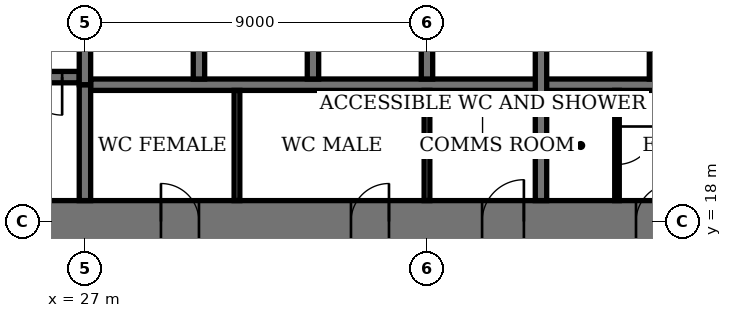
"""IFC4 building model, lengths in metres.
Left out: names, types, materials, properties, quantities, classifications, styles, units other than length and angle.
Written with IfcOpenShell. Run it as: python <this file> out.ifc"""

import sys

from ifc_helpers import new_model, si_unit, direction, frame, frame_2d, origin, place, context, subcontext, project, spatial, rectangle, extrude, element, fill, save


model = new_model("IFC4")
c1 = context("Model", 3, precision=1e-05, world=origin(), true_north=direction((0.0, 1.0)))
c2 = subcontext(c1, "Body", "Model", "MODEL_VIEW")
j1 = project(units=[si_unit("LENGTHUNIT", "METRE"), si_unit("PLANEANGLEUNIT", "RADIAN")], contexts=[c1])
p1 = place(None, origin())
s1 = spatial("IfcSite", under=j1, at=p1, CompositionType="ELEMENT")
p2 = place(p1, origin())
s2 = spatial("IfcBuilding", under=s1, at=p2, CompositionType="ELEMENT")
p3 = place(p2, frame((0.0, 0.0, 97.0)))
s3 = spatial("IfcBuildingStorey", under=s2, at=p3, CompositionType="ELEMENT", Elevation=97.0)
p4 = place(p3, frame((17.45, 18.0, 0.0), z_axis=(0.0, 0.0, 1.0), x_axis=(1.0, 0.0, 0.0)))
e1 = element("IfcWall", 1, at=p4, inside=s3, PredefinedType="SHEAR", context=c2, shape_type="SweptSolid", body=[
    extrude(rectangle(XDim=28.1, YDim=1.1, at=frame_2d((14.05, 0.0))), origin(), (0.0, 0.0, 1.0), 4.0),
])
p5 = place(p4, frame((11.55, 0.0, 0.0)))
e2 = element("IfcOpeningElement", 2, at=p5, cuts=e1, PredefinedType="OPENING", context=c2, shape_type="SweptSolid", body=[
    extrude(rectangle(XDim=1.0, YDim=2.4, at=frame_2d((0.5, 1.2))), frame((0.0, 0.56, 0.0), z_axis=(0.0, -1.0, 0.0), x_axis=(1.0, 0.0, 0.0)), (0.0, 0.0, 1.0), 1.12),
])
p6 = place(p4, frame((16.55, 0.0, 0.0)))
e3 = element("IfcOpeningElement", 3, at=p6, cuts=e1, PredefinedType="OPENING", context=c2, shape_type="SweptSolid", body=[
    extrude(rectangle(XDim=1.0, YDim=2.4, at=frame_2d((0.5, 1.2))), frame((0.0, 0.56, 0.0), z_axis=(0.0, -1.0, 0.0), x_axis=(1.0, 0.0, 0.0)), (0.0, 0.0, 1.0), 1.12),
])
p7 = place(p4, frame((20.0, 0.0, 0.0)))
e4 = element("IfcOpeningElement", 4, at=p7, cuts=e1, PredefinedType="OPENING", context=c2, shape_type="SweptSolid", body=[
    extrude(rectangle(XDim=1.1, YDim=2.4, at=frame_2d((0.55, 1.2))), frame((0.0, 0.56, 0.0), z_axis=(0.0, -1.0, 0.0), x_axis=(1.0, 0.0, 0.0)), (0.0, 0.0, 1.0), 1.12),
])
p8 = place(p4, frame((24.05, 0.0, 0.0)))
e5 = element("IfcOpeningElement", 5, at=p8, cuts=e1, PredefinedType="OPENING", context=c2, shape_type="SweptSolid", body=[
    extrude(rectangle(XDim=1.0, YDim=2.4, at=frame_2d((0.5, 1.2))), frame((0.0, 0.56, 0.0), z_axis=(0.0, -1.0, 0.0), x_axis=(1.0, 0.0, 0.0)), (0.0, 0.0, 1.0), 1.12),
])
p9 = place(p3, frame((18.55, 21.8, 0.0), z_axis=(0.0, 0.0, 1.0), x_axis=(1.0, 0.0, 0.0)))
e6 = element("IfcWall", 6, at=p9, inside=s3, PredefinedType="SHEAR", context=c2, shape_type="SweptSolid", body=[
    extrude(rectangle(XDim=8.3, YDim=0.3, at=frame_2d((4.15, 0.0))), origin(), (0.0, 0.0, 1.0), 4.0),
])
p10 = place(p9, frame((6.85, 0.0, 0.0)))
e7 = element("IfcOpeningElement", 7, at=p10, cuts=e6, PredefinedType="OPENING", context=c2, shape_type="SweptSolid", body=[
    extrude(rectangle(XDim=1.0, YDim=2.4, at=frame_2d((0.5, 1.2))), frame((0.0, 0.16, 0.0), z_axis=(0.0, -1.0, 0.0), x_axis=(1.0, 0.0, 0.0)), (0.0, 0.0, 1.0), 0.32),
])
p11 = place(p3, frame((27.0, 18.55, 0.0), z_axis=(0.0, 0.0, 1.0), x_axis=(0.0, 1.0, 0.0)))
e8 = element("IfcWall", 8, at=p11, inside=s3, PredefinedType="SHEAR", context=c2, shape_type="SweptSolid", body=[
    extrude(rectangle(XDim=3.05, YDim=0.3, at=frame_2d((1.525, 0.0))), origin(), (0.0, 0.0, 1.0), 4.0),
])
p12 = place(p3, frame((27.15, 21.6, 0.0), z_axis=(0.0, 0.0, 1.0), x_axis=(1.0, 0.0, 0.0)))
e9 = element("IfcWall", 9, at=p12, inside=s3, PredefinedType="SHEAR", context=c2, shape_type="SweptSolid", body=[
    extrude(rectangle(XDim=17.3, YDim=0.3, at=frame_2d((8.65, 0.0))), origin(), (0.0, 0.0, 1.0), 4.0),
])
for number, where, z_axis, x_axis in (
    (10, (30.0, 21.75, 0.0), (0.0, 0.0, 1.0), (0.0, 1.0, 0.0)),
    (11, (33.0, 21.75, 0.0), (0.0, 0.0, 1.0), (0.0, 1.0, 0.0)),
    (12, (36.0, 21.75, 0.0), (0.0, 0.0, 1.0), (0.0, 1.0, 0.0)),
):
    element("IfcWall", number, at=place(p3, frame(where, z_axis=z_axis, x_axis=x_axis)), inside=s3, PredefinedType="SHEAR", context=c2, shape_type="SweptSolid", body=[
        extrude(rectangle(XDim=2.7, YDim=0.3, at=frame_2d((1.35, 0.0))), origin(), (0.0, 0.0, 1.0), 4.0),
    ])
p13 = place(p3, frame((39.0, 18.55, 0.0), z_axis=(0.0, 0.0, 1.0), x_axis=(0.0, 1.0, 0.0)))
e13 = element("IfcWall", 13, at=p13, inside=s3, PredefinedType="SHEAR", context=c2, shape_type="SweptSolid", body=[
    extrude(rectangle(XDim=5.9, YDim=0.3, at=frame_2d((2.95, 0.0))), origin(), (0.0, 0.0, 1.0), 4.0),
])
p14 = place(p3, frame((42.0, 21.75, 0.0), z_axis=(0.0, 0.0, 1.0), x_axis=(0.0, 1.0, 0.0)))
e14 = element("IfcWall", 14, at=p14, inside=s3, PredefinedType="SHEAR", context=c2, shape_type="SweptSolid", body=[
    extrude(rectangle(XDim=2.7, YDim=0.3, at=frame_2d((1.35, 0.0))), origin(), (0.0, 0.0, 1.0), 4.0),
])
p15 = place(p3, frame((27.0, 21.6, 0.0), z_axis=(0.0, 0.0, 1.0), x_axis=(0.0, 1.0, 0.0)))
e15 = element("IfcWall", 15, at=p15, inside=s3, PredefinedType="SHEAR", context=c2, shape_type="SweptSolid", body=[
    extrude(rectangle(XDim=2.85, YDim=0.3, at=frame_2d((1.425, 0.0))), origin(), (0.0, 0.0, 1.0), 4.0),
])
for number, where, z_axis, x_axis in (
    (16, (31.0, 18.55, 0.0), (0.0, 0.0, 1.0), (0.0, 1.0, 0.0)),
    (17, (36.0, 18.55, 0.0), (0.0, 0.0, 1.0), (0.0, 1.0, 0.0)),
):
    element("IfcWall", number, at=place(p3, frame(where, z_axis=z_axis, x_axis=x_axis)), inside=s3, PredefinedType="PARTITIONING", context=c2, shape_type="SweptSolid", body=[
        extrude(rectangle(XDim=2.9, YDim=0.15, at=frame_2d((1.45, 0.0))), origin(), (0.0, 0.0, 1.0), 3.75),
    ])
p16 = place(p3, frame((41.0, 18.55, 0.0), z_axis=(0.0, 0.0, 1.0), x_axis=(0.0, 1.0, 0.0)))
e18 = element("IfcWall", 18, at=p16, inside=s3, PredefinedType="PARTITIONING", context=c2, shape_type="SweptSolid", body=[
    extrude(rectangle(XDim=2.9, YDim=0.12, at=frame_2d((1.45, 0.0))), origin(), (0.0, 0.0, 1.0), 3.75),
])
p17 = place(p16, frame((0.95, 0.0, 0.0)))
e19 = element("IfcOpeningElement", 19, at=p17, cuts=e18, PredefinedType="OPENING", context=c2, shape_type="SweptSolid", body=[
    extrude(rectangle(XDim=1.0, YDim=2.4, at=frame_2d((0.5, 1.2))), frame((0.0, 0.07, 0.0), z_axis=(0.0, -1.0, 0.0), x_axis=(1.0, 0.0, 0.0)), (0.0, 0.0, 1.0), 0.14),
])
p18 = place(p5, origin())
e20 = element("IfcDoor", 20, at=p18, inside=s3, OperationType="SINGLE_SWING_RIGHT", PredefinedType="DOOR", context=c2, shape_type="SweptSolid", body=[
    extrude(rectangle(XDim=1.0, YDim=2.4, at=frame_2d((0.5, 1.2))), frame((0.0, 0.025, 0.0), z_axis=(0.0, -1.0, 0.0), x_axis=(1.0, 0.0, 0.0)), (0.0, 0.0, 1.0), 0.05),
    extrude(rectangle(XDim=0.04, YDim=2.4, at=frame_2d((0.02, 1.2))), frame((0.0, 0.4, 0.0), z_axis=(0.0, -1.0, 0.0), x_axis=(1.0, 0.0, 0.0)), (0.0, 0.0, 1.0), 0.8),
    extrude(rectangle(XDim=0.04, YDim=2.4, at=frame_2d((0.98, 1.2))), frame((0.0, 0.4, 0.0), z_axis=(0.0, -1.0, 0.0), x_axis=(1.0, 0.0, 0.0)), (0.0, 0.0, 1.0), 0.8),
    extrude(rectangle(XDim=1.0, YDim=0.04, at=frame_2d((0.5, 2.38))), frame((0.0, 0.4, 0.0), z_axis=(0.0, -1.0, 0.0), x_axis=(1.0, 0.0, 0.0)), (0.0, 0.0, 1.0), 0.8),
])
fill(e2, e20)
p19 = place(p6, origin())
e21 = element("IfcDoor", 21, at=p19, inside=s3, OperationType="SINGLE_SWING_LEFT", PredefinedType="DOOR", context=c2, shape_type="SweptSolid", body=[
    extrude(rectangle(XDim=1.0, YDim=2.4, at=frame_2d((0.5, 1.2))), frame((0.0, 0.025, 0.0), z_axis=(0.0, -1.0, 0.0), x_axis=(1.0, 0.0, 0.0)), (0.0, 0.0, 1.0), 0.05),
    extrude(rectangle(XDim=0.04, YDim=2.4, at=frame_2d((0.02, 1.2))), frame((0.0, 0.4, 0.0), z_axis=(0.0, -1.0, 0.0), x_axis=(1.0, 0.0, 0.0)), (0.0, 0.0, 1.0), 0.8),
    extrude(rectangle(XDim=0.04, YDim=2.4, at=frame_2d((0.98, 1.2))), frame((0.0, 0.4, 0.0), z_axis=(0.0, -1.0, 0.0), x_axis=(1.0, 0.0, 0.0)), (0.0, 0.0, 1.0), 0.8),
    extrude(rectangle(XDim=1.0, YDim=0.04, at=frame_2d((0.5, 2.38))), frame((0.0, 0.4, 0.0), z_axis=(0.0, -1.0, 0.0), x_axis=(1.0, 0.0, 0.0)), (0.0, 0.0, 1.0), 0.8),
])
fill(e3, e21)
p20 = place(p7, origin())
e22 = element("IfcDoor", 22, at=p20, inside=s3, OperationType="SINGLE_SWING_LEFT", PredefinedType="DOOR", context=c2, shape_type="SweptSolid", body=[
    extrude(rectangle(XDim=1.1, YDim=2.4, at=frame_2d((0.55, 1.2))), frame((0.0, 0.025, 0.0), z_axis=(0.0, -1.0, 0.0), x_axis=(1.0, 0.0, 0.0)), (0.0, 0.0, 1.0), 0.05),
    extrude(rectangle(XDim=0.04, YDim=2.4, at=frame_2d((0.02, 1.2))), frame((0.0, 0.44, 0.0), z_axis=(0.0, -1.0, 0.0), x_axis=(1.0, 0.0, 0.0)), (0.0, 0.0, 1.0), 0.88),
    extrude(rectangle(XDim=0.04, YDim=2.4, at=frame_2d((1.08, 1.2))), frame((0.0, 0.44, 0.0), z_axis=(0.0, -1.0, 0.0), x_axis=(1.0, 0.0, 0.0)), (0.0, 0.0, 1.0), 0.88),
    extrude(rectangle(XDim=1.1, YDim=0.04, at=frame_2d((0.55, 2.38))), frame((0.0, 0.44, 0.0), z_axis=(0.0, -1.0, 0.0), x_axis=(1.0, 0.0, 0.0)), (0.0, 0.0, 1.0), 0.88),
])
fill(e4, e22)
p21 = place(p8, origin())
e23 = element("IfcDoor", 23, at=p21, inside=s3, OperationType="SINGLE_SWING_LEFT", PredefinedType="DOOR", context=c2, shape_type="SweptSolid", body=[
    extrude(rectangle(XDim=1.0, YDim=2.4, at=frame_2d((0.5, 1.2))), frame((0.0, 0.025, 0.0), z_axis=(0.0, -1.0, 0.0), x_axis=(1.0, 0.0, 0.0)), (0.0, 0.0, 1.0), 0.05),
    extrude(rectangle(XDim=0.04, YDim=2.4, at=frame_2d((0.02, 1.2))), frame((0.0, 0.4, 0.0), z_axis=(0.0, -1.0, 0.0), x_axis=(1.0, 0.0, 0.0)), (0.0, 0.0, 1.0), 0.8),
    extrude(rectangle(XDim=0.04, YDim=2.4, at=frame_2d((0.98, 1.2))), frame((0.0, 0.4, 0.0), z_axis=(0.0, -1.0, 0.0), x_axis=(1.0, 0.0, 0.0)), (0.0, 0.0, 1.0), 0.8),
    extrude(rectangle(XDim=1.0, YDim=0.04, at=frame_2d((0.5, 2.38))), frame((0.0, 0.4, 0.0), z_axis=(0.0, -1.0, 0.0), x_axis=(1.0, 0.0, 0.0)), (0.0, 0.0, 1.0), 0.8),
])
fill(e5, e23)
p22 = place(p10, origin())
e24 = element("IfcDoor", 24, at=p22, inside=s3, OperationType="SINGLE_SWING_RIGHT", PredefinedType="DOOR", context=c2, shape_type="SweptSolid", body=[
    extrude(rectangle(XDim=1.0, YDim=2.4, at=frame_2d((0.5, 1.2))), frame((0.0, 0.03, 0.0), z_axis=(0.0, -1.0, 0.0), x_axis=(1.0, 0.0, 0.0)), (0.0, 0.0, 1.0), 0.06),
])
fill(e7, e24)
p23 = place(p17, origin())
e25 = element("IfcDoor", 25, at=p23, inside=s3, OperationType="SINGLE_SWING_RIGHT", PredefinedType="DOOR", context=c2, shape_type="SweptSolid", body=[
    extrude(rectangle(XDim=1.0, YDim=2.4, at=frame_2d((0.5, 1.2))), frame((0.0, 0.03, 0.0), z_axis=(0.0, -1.0, 0.0), x_axis=(1.0, 0.0, 0.0)), (0.0, 0.0, 1.0), 0.06),
])
fill(e19, e25)
save(model, sys.argv[1])
